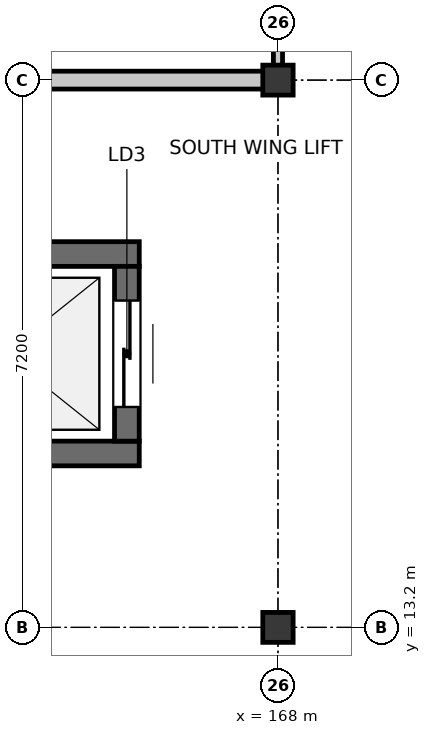
"""IFC4 building model, lengths in metres.
Left out: names, types, materials, properties, quantities, classifications, styles, units other than length and angle.
Written with IfcOpenShell. Run it as: python <this file> out.ifc"""

import sys

from ifc_helpers import new_model, si_unit, direction, frame, frame_2d, origin, origin_2d, place, context, subcontext, project, spatial, rectangle, i_section, extrude, element, fill, save


model = new_model("IFC4")
c1 = context("Model", 3, precision=1e-05, world=origin(), true_north=direction((0.0, 1.0)))
c2 = subcontext(c1, "Body", "Model", "MODEL_VIEW")
j1 = project(units=[si_unit("LENGTHUNIT", "METRE"), si_unit("PLANEANGLEUNIT", "RADIAN")], contexts=[c1])
p1 = place(None, origin())
s1 = spatial("IfcSite", under=j1, at=p1, CompositionType="ELEMENT")
p2 = place(p1, origin())
s2 = spatial("IfcBuilding", under=s1, at=p2, CompositionType="ELEMENT")
p3 = place(p2, frame((0.0, 0.0, -4.5)))
s3 = spatial("IfcBuildingStorey", under=s2, at=p3, CompositionType="ELEMENT", Elevation=-4.5)
for number, where, z_axis, x_axis in (
    (1, (168.0, 13.2, 0.0), (0.0, 0.0, 1.0), (1.0, 0.0, 0.0)),
    (2, (168.0, 20.4, 0.0), (0.0, 0.0, 1.0), (1.0, 0.0, 0.0)),
):
    element("IfcColumn", number, at=place(p3, frame(where, z_axis=z_axis, x_axis=x_axis)), inside=s3, PredefinedType="COLUMN", context=c2, shape_type="SweptSolid", body=[
        extrude(i_section(OverallWidth=0.399, OverallDepth=0.394, WebThickness=0.023, FlangeThickness=0.037, FilletRadius=0.015, at=origin_2d()), origin(), (0.0, 0.0, 1.0), 4.5),
    ])
for number, where, z_axis, x_axis in (
    (3, (166.175, 15.488, 0.0), (0.0, 0.0, 1.0), (-1.0, 0.0, 0.0)),
    (4, (162.625, 18.112, 0.0), (0.0, 0.0, 1.0), (1.0, 0.0, 0.0)),
):
    element("IfcWall", number, at=place(p3, frame(where, z_axis=z_axis, x_axis=x_axis)), inside=s3, PredefinedType="SHEAR", context=c2, shape_type="SweptSolid", body=[
        extrude(rectangle(XDim=3.55, YDim=0.325, at=frame_2d((1.775, 0.0))), origin(), (0.0, 0.0, 1.0), 4.18),
    ])
p4 = place(p3, frame((166.012, 17.95, 0.0), z_axis=(0.0, 0.0, 1.0), x_axis=(0.0, -1.0, 0.0)))
e5 = element("IfcWall", 5, at=p4, inside=s3, PredefinedType="SHEAR", context=c2, shape_type="SweptSolid", body=[
    extrude(rectangle(XDim=2.3, YDim=0.325, at=frame_2d((1.15, 0.0))), origin(), (0.0, 0.0, 1.0), 4.18),
])
p5 = place(p4, frame((0.45, 0.0, 0.0)))
e6 = element("IfcOpeningElement", 6, at=p5, cuts=e5, PredefinedType="OPENING", context=c2, shape_type="SweptSolid", body=[
    extrude(rectangle(XDim=1.4, YDim=2.3, at=frame_2d((0.7, 1.15))), frame((0.0, 0.172, 0.0), z_axis=(0.0, -1.0, 0.0), x_axis=(1.0, 0.0, 0.0)), (0.0, 0.0, 1.0), 0.345),
])
p6 = place(p3, frame((168.08, 20.4, 0.0), z_axis=(0.0, 0.0, 1.0), x_axis=(-1.0, 0.0, 0.0)))
e7 = element("IfcWall", 7, at=p6, inside=s3, PredefinedType="PARTITIONING", context=c2, shape_type="SweptSolid", body=[
    extrude(rectangle(XDim=14.56, YDim=0.235, at=frame_2d((7.28, 0.0))), origin(), (0.0, 0.0, 1.0), 3.403),
])
p7 = place(p3, frame((168.0, 59.873, 0.0), z_axis=(0.0, 0.0, 1.0), x_axis=(0.0, -1.0, 0.0)))
e8 = element("IfcWall", 8, at=p7, inside=s3, PredefinedType="PARTITIONING", context=c2, shape_type="SweptSolid", body=[
    extrude(rectangle(XDim=39.354, YDim=0.12, at=frame_2d((19.677, 0.0))), origin(), (0.0, 0.0, 1.0), 3.403),
])
p8 = place(p7, frame((19.027, 0.0, 0.0)))
e9 = element("IfcOpeningElement", 9, at=p8, cuts=e8, PredefinedType="OPENING", context=c2, shape_type="SweptSolid", body=[
    extrude(rectangle(XDim=1.3, YDim=2.1, at=frame_2d((0.65, 1.05))), frame((0.0, 0.07, 0.0), z_axis=(0.0, -1.0, 0.0), x_axis=(1.0, 0.0, 0.0)), (0.0, 0.0, 1.0), 0.14),
])
p9 = place(p5, origin())
e10 = element("IfcDoor", 10, at=p9, inside=s3, OperationType="DOUBLE_DOOR_SLIDING", PredefinedType="DOOR", context=c2, shape_type="SweptSolid", body=[
    extrude(rectangle(XDim=1.4, YDim=2.3, at=frame_2d((0.7, 1.15))), frame((0.0, 0.025, 0.0), z_axis=(0.0, -1.0, 0.0), x_axis=(1.0, 0.0, 0.0)), (0.0, 0.0, 1.0), 0.05),
])
fill(e6, e10)
save(model, sys.argv[1])
